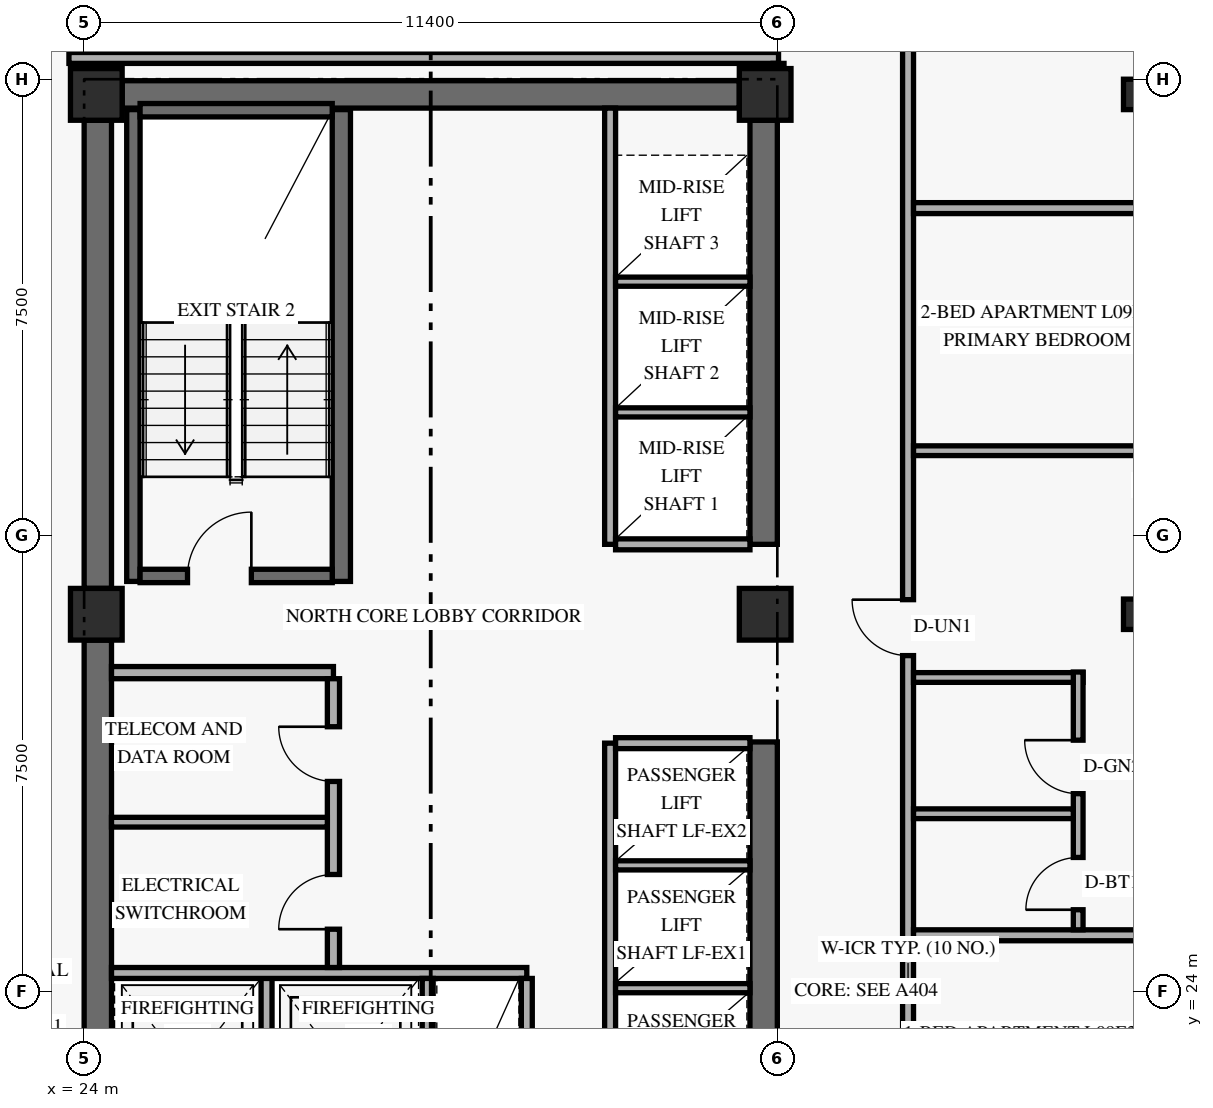
"""IFC4 building model, lengths in metres.
Left out: names, types, materials, properties, quantities, classifications, styles, units other than length and angle.
Written with IfcOpenShell. Run it as: python <this file> out.ifc"""

import sys

from ifc_helpers import new_model, si_unit, direction, frame, frame_2d, origin, origin_2d, place, context, subcontext, project, spatial, rectangle, hollow_rectangle, extrude, element, fill, save


model = new_model("IFC4")
c1 = context("Model", 3, precision=1e-05, world=origin(), true_north=direction((0.0, 1.0)))
c2 = subcontext(c1, "Body", "Model", "MODEL_VIEW")
j1 = project(units=[si_unit("LENGTHUNIT", "METRE"), si_unit("PLANEANGLEUNIT", "RADIAN")], contexts=[c1])
p1 = place(None, origin())
s1 = spatial("IfcSite", under=j1, at=p1, CompositionType="ELEMENT")
p2 = place(p1, origin())
s2 = spatial("IfcBuilding", under=s1, at=p2, CompositionType="ELEMENT")
p3 = place(p2, frame((0.0, 0.0, 38.4)))
s3 = spatial("IfcBuildingStorey", under=s2, at=p3, CompositionType="ELEMENT", Elevation=38.4)
p4 = place(p3, frame((24.225, 17.975, 0.0), z_axis=(0.0, 0.0, 1.0), x_axis=(0.0, 1.0, 0.0)))
e1 = element("IfcWall", 1, at=p4, inside=s3, PredefinedType="SHEAR", context=c2, shape_type="SweptSolid", body=[
    extrude(rectangle(XDim=11.8, YDim=0.45, at=frame_2d((5.9, 0.0))), origin(), (0.0, 0.0, 1.0), 2.667),
])
p5 = place(p3, frame((24.225, 30.625, 0.0), z_axis=(0.0, 0.0, 1.0), x_axis=(0.0, 1.0, 0.0)))
e2 = element("IfcWall", 2, at=p5, inside=s3, PredefinedType="SHEAR", context=c2, shape_type="SweptSolid", body=[
    extrude(rectangle(XDim=7.7, YDim=0.45, at=frame_2d((3.85, 0.0))), origin(), (0.0, 0.0, 1.0), 2.667),
])
p6 = place(p3, frame((35.175, 17.975, 0.0), z_axis=(0.0, 0.0, 1.0), x_axis=(0.0, 1.0, 0.0)))
e3 = element("IfcWall", 3, at=p6, inside=s3, PredefinedType="SHEAR", context=c2, shape_type="SweptSolid", body=[
    extrude(rectangle(XDim=10.125, YDim=0.45, at=frame_2d((5.062, 0.0))), origin(), (0.0, 0.0, 1.0), 2.667),
])
p7 = place(p3, frame((35.175, 31.35, 0.0), z_axis=(0.0, 0.0, 1.0), x_axis=(0.0, 1.0, 0.0)))
e4 = element("IfcWall", 4, at=p7, inside=s3, PredefinedType="SHEAR", context=c2, shape_type="SweptSolid", body=[
    extrude(rectangle(XDim=6.975, YDim=0.45, at=frame_2d((3.487, 0.0))), origin(), (0.0, 0.0, 1.0), 2.667),
])
p8 = place(p3, frame((24.625, 38.75, 0.0), z_axis=(0.0, 0.0, 1.0), x_axis=(1.0, 0.0, 0.0)))
e5 = element("IfcWall", 5, at=p8, inside=s3, PredefinedType="SHEAR", context=c2, shape_type="SweptSolid", body=[
    extrude(rectangle(XDim=10.15, YDim=0.45, at=frame_2d((5.075, 0.0))), origin(), (0.0, 0.0, 1.0), 3.36),
])
p9 = place(p3, frame((24.81, 30.74, 0.0), z_axis=(0.0, 0.0, 1.0), x_axis=(0.0, 1.0, 0.0)))
e6 = element("IfcWall", 6, at=p9, inside=s3, PredefinedType="SHEAR", context=c2, shape_type="SweptSolid", body=[
    extrude(rectangle(XDim=7.76, YDim=0.22, at=frame_2d((3.88, 0.0))), origin(), (0.0, 0.0, 1.0), 3.36),
])
p10 = place(p3, frame((28.23, 30.74, 0.0), z_axis=(0.0, 0.0, 1.0), x_axis=(0.0, 1.0, 0.0)))
e7 = element("IfcWall", 7, at=p10, inside=s3, PredefinedType="SHEAR", context=c2, shape_type="SweptSolid", body=[
    extrude(rectangle(XDim=7.76, YDim=0.3, at=frame_2d((3.88, 0.0))), origin(), (0.0, 0.0, 1.0), 3.36),
])
p11 = place(p3, frame((24.92, 30.83, 0.0), z_axis=(0.0, 0.0, 1.0), x_axis=(1.0, 0.0, 0.0)))
e8 = element("IfcWall", 8, at=p11, inside=s3, PredefinedType="SHEAR", context=c2, shape_type="SweptSolid", body=[
    extrude(rectangle(XDim=3.16, YDim=0.22, at=frame_2d((1.58, 0.0))), origin(), (0.0, 0.0, 1.0), 3.36),
])
p12 = place(p11, frame((0.78, 0.0, 0.0)))
e9 = element("IfcOpeningElement", 9, at=p12, cuts=e8, PredefinedType="OPENING", context=c2, shape_type="SweptSolid", body=[
    extrude(rectangle(XDim=1.05, YDim=2.15, at=frame_2d((0.525, 1.075))), frame((0.0, 0.12, 0.0), z_axis=(0.0, -1.0, 0.0), x_axis=(1.0, 0.0, 0.0)), (0.0, 0.0, 1.0), 0.24),
])
p13 = place(p3, frame((24.92, 38.49, 0.0), z_axis=(0.0, 0.0, 1.0), x_axis=(1.0, 0.0, 0.0)))
e10 = element("IfcWall", 10, at=p13, inside=s3, PredefinedType="SHEAR", context=c2, shape_type="SweptSolid", body=[
    extrude(rectangle(XDim=3.16, YDim=0.22, at=frame_2d((1.58, 0.0))), origin(), (0.0, 0.0, 1.0), 3.36),
])
for number, where, z_axis, x_axis in (
    (11, (24.2, 30.2, 0.0), (0.0, 0.0, 1.0), (1.0, 0.0, 0.0)),
    (12, (24.2, 38.75, 0.0), (0.0, 0.0, 1.0), (1.0, 0.0, 0.0)),
    (13, (35.2, 30.2, 0.0), (0.0, 0.0, 1.0), (1.0, 0.0, 0.0)),
    (14, (35.2, 38.75, 0.0), (0.0, 0.0, 1.0), (1.0, 0.0, 0.0)),
):
    element("IfcColumn", number, at=place(p3, frame(where, z_axis=z_axis, x_axis=x_axis)), inside=s3, PredefinedType="COLUMN", context=c2, shape_type="SweptSolid", body=[
        extrude(rectangle(XDim=0.85, YDim=0.85, at=origin_2d()), origin(), (0.0, 0.0, 1.0), 3.6),
    ])
for number, where, z_axis, x_axis in (
    (15, (41.28, 30.2, 0.0), (0.035, 0.0, 0.999), (0.0, 1.0, 0.0)),
    (16, (41.28, 38.75, 0.0), (0.035, 0.0, 0.999), (0.0, 1.0, 0.0)),
):
    element("IfcColumn", number, at=place(p3, frame(where, z_axis=z_axis, x_axis=x_axis)), inside=s3, PredefinedType="COLUMN", context=c2, shape_type="SweptSolid", body=[
        extrude(hollow_rectangle(XDim=0.5, YDim=0.5, WallThickness=0.022, at=origin_2d()), origin(), (0.0, 0.0, 1.0), 3.602),
    ])
p14 = place(p3, frame((27.0, 21.19, 0.0), z_axis=(0.0, 0.0, 1.0), x_axis=(0.0, 1.0, 0.0)))
e17 = element("IfcWall", 17, at=p14, inside=s3, PredefinedType="STANDARD", context=c2, shape_type="SweptSolid", body=[
    extrude(rectangle(XDim=3.11, YDim=0.18, at=frame_2d((1.555, 0.0))), origin(), (0.0, 0.0, 1.0), 3.36),
])
p15 = place(p3, frame((24.45, 24.3, 0.0), z_axis=(0.0, 0.0, 1.0), x_axis=(1.0, 0.0, 0.0)))
e18 = element("IfcWall", 18, at=p15, inside=s3, PredefinedType="STANDARD", context=c2, shape_type="SweptSolid", body=[
    extrude(rectangle(XDim=6.83, YDim=0.18, at=frame_2d((3.415, 0.0))), origin(), (0.0, 0.0, 1.0), 3.36),
])
for number, where, z_axis, x_axis in (
    (19, (29.65, 21.19, 0.0), (0.0, 0.0, 1.0), (0.0, 1.0, 0.0)),
    (20, (31.28, 21.19, 0.0), (0.0, 0.0, 1.0), (0.0, 1.0, 0.0)),
):
    element("IfcWall", number, at=place(p3, frame(where, z_axis=z_axis, x_axis=x_axis)), inside=s3, PredefinedType="STANDARD", context=c2, shape_type="SweptSolid", body=[
        extrude(rectangle(XDim=3.02, YDim=0.18, at=frame_2d((1.51, 0.0))), origin(), (0.0, 0.0, 1.0), 3.36),
    ])
p16 = place(p3, frame((24.45, 29.24, 0.0), z_axis=(0.0, 0.0, 1.0), x_axis=(1.0, 0.0, 0.0)))
e21 = element("IfcWall", 21, at=p16, inside=s3, PredefinedType="STANDARD", context=c2, shape_type="SweptSolid", body=[
    extrude(rectangle(XDim=3.65, YDim=0.2, at=frame_2d((1.825, 0.0))), origin(), (0.0, 0.0, 1.0), 3.36),
])
p17 = place(p3, frame((28.1, 24.39, 0.0), z_axis=(0.0, 0.0, 1.0), x_axis=(0.0, 1.0, 0.0)))
e22 = element("IfcWall", 22, at=p17, inside=s3, PredefinedType="STANDARD", context=c2, shape_type="SweptSolid", body=[
    extrude(rectangle(XDim=4.75, YDim=0.2, at=frame_2d((2.375, 0.0))), origin(), (0.0, 0.0, 1.0), 3.36),
])
p18 = place(p17, frame((0.63, 0.0, 0.0)))
e23 = element("IfcOpeningElement", 23, at=p18, cuts=e22, PredefinedType="OPENING", context=c2, shape_type="SweptSolid", body=[
    extrude(rectangle(XDim=0.9, YDim=2.1, at=frame_2d((0.45, 1.05))), frame((0.0, 0.11, 0.0), z_axis=(0.0, -1.0, 0.0), x_axis=(1.0, 0.0, 0.0)), (0.0, 0.0, 1.0), 0.22),
])
p19 = place(p17, frame((3.06, 0.0, 0.0)))
e24 = element("IfcOpeningElement", 24, at=p19, cuts=e22, PredefinedType="OPENING", context=c2, shape_type="SweptSolid", body=[
    extrude(rectangle(XDim=0.9, YDim=2.1, at=frame_2d((0.45, 1.05))), frame((0.0, 0.11, 0.0), z_axis=(0.0, -1.0, 0.0), x_axis=(1.0, 0.0, 0.0)), (0.0, 0.0, 1.0), 0.22),
])
p20 = place(p3, frame((24.45, 26.78, 0.0), z_axis=(0.0, 0.0, 1.0), x_axis=(1.0, 0.0, 0.0)))
e25 = element("IfcWall", 25, at=p20, inside=s3, PredefinedType="PARTITIONING", context=c2, shape_type="SweptSolid", body=[
    extrude(rectangle(XDim=3.55, YDim=0.16, at=frame_2d((1.775, 0.0))), origin(), (0.0, 0.0, 1.0), 3.36),
])
p21 = place(p3, frame((32.65, 18.02, 0.0), z_axis=(0.0, 0.0, 1.0), x_axis=(0.0, 1.0, 0.0)))
e26 = element("IfcWall", 26, at=p21, inside=s3, PredefinedType="STANDARD", context=c2, shape_type="SweptSolid", body=[
    extrude(rectangle(XDim=10.06, YDim=0.18, at=frame_2d((5.03, 0.0))), origin(), (0.0, 0.0, 1.0), 3.36),
])
p22 = place(p3, frame((32.74, 28.08, 0.0), z_axis=(0.0, 0.0, 1.0), x_axis=(1.0, 0.0, 0.0)))
e27 = element("IfcWall", 27, at=p22, inside=s3, PredefinedType="STANDARD", context=c2, shape_type="SweptSolid", body=[
    extrude(rectangle(XDim=2.21, YDim=0.18, at=frame_2d((1.105, 0.0))), origin(), (0.0, 0.0, 1.0), 3.36),
])
for number, where, z_axis, x_axis in (
    (28, (32.74, 24.05, 0.0), (0.0, 0.0, 1.0), (1.0, 0.0, 0.0)),
    (29, (32.74, 26.07, 0.0), (0.0, 0.0, 1.0), (1.0, 0.0, 0.0)),
):
    element("IfcWall", number, at=place(p3, frame(where, z_axis=z_axis, x_axis=x_axis)), inside=s3, PredefinedType="STANDARD", context=c2, shape_type="SweptSolid", body=[
        extrude(rectangle(XDim=2.21, YDim=0.15, at=frame_2d((1.105, 0.0))), origin(), (0.0, 0.0, 1.0), 3.36),
    ])
p23 = place(p3, frame((32.65, 31.35, 0.0), z_axis=(0.0, 0.0, 1.0), x_axis=(0.0, 1.0, 0.0)))
e30 = element("IfcWall", 30, at=p23, inside=s3, PredefinedType="STANDARD", context=c2, shape_type="SweptSolid", body=[
    extrude(rectangle(XDim=7.175, YDim=0.18, at=frame_2d((3.587, 0.0))), origin(), (0.0, 0.0, 1.0), 3.36),
])
p24 = place(p3, frame((32.74, 31.35, 0.0), z_axis=(0.0, 0.0, 1.0), x_axis=(1.0, 0.0, 0.0)))
e31 = element("IfcWall", 31, at=p24, inside=s3, PredefinedType="STANDARD", context=c2, shape_type="SweptSolid", body=[
    extrude(rectangle(XDim=2.21, YDim=0.18, at=frame_2d((1.105, 0.0))), origin(), (0.0, 0.0, 1.0), 3.36),
])
for number, where, z_axis, x_axis in (
    (32, (32.74, 33.52, 0.0), (0.0, 0.0, 1.0), (1.0, 0.0, 0.0)),
    (33, (32.74, 35.67, 0.0), (0.0, 0.0, 1.0), (1.0, 0.0, 0.0)),
):
    element("IfcWall", number, at=place(p3, frame(where, z_axis=z_axis, x_axis=x_axis)), inside=s3, PredefinedType="STANDARD", context=c2, shape_type="SweptSolid", body=[
        extrude(rectangle(XDim=2.21, YDim=0.15, at=frame_2d((1.105, 0.0))), origin(), (0.0, 0.0, 1.0), 3.36),
    ])
p25 = place(p3, frame((37.55, 1.29, 0.0), z_axis=(0.0, 0.0, 1.0), x_axis=(0.0, 1.0, 0.0)))
e34 = element("IfcWall", 34, at=p25, inside=s3, PredefinedType="STANDARD", context=c2, shape_type="SweptSolid", body=[
    extrude(rectangle(XDim=45.42, YDim=0.18, at=frame_2d((22.71, 0.0))), origin(), (0.0, 0.0, 1.0), 2.649),
])
p26 = place(p25, frame((4.46, 0.0, 0.0)))
e35 = element("IfcOpeningElement", 35, at=p26, cuts=e34, PredefinedType="OPENING", context=c2, shape_type="SweptSolid", body=[
    extrude(rectangle(XDim=0.92, YDim=2.15, at=frame_2d((0.46, 1.075))), frame((0.0, 0.1, 0.0), z_axis=(0.0, -1.0, 0.0), x_axis=(1.0, 0.0, 0.0)), (0.0, 0.0, 1.0), 0.2),
])
p27 = place(p25, frame((15.907, 0.0, 0.0)))
e36 = element("IfcOpeningElement", 36, at=p27, cuts=e34, PredefinedType="OPENING", context=c2, shape_type="SweptSolid", body=[
    extrude(rectangle(XDim=0.92, YDim=2.15, at=frame_2d((0.46, 1.075))), frame((0.0, 0.1, 0.0), z_axis=(0.0, -1.0, 0.0), x_axis=(1.0, 0.0, 0.0)), (0.0, 0.0, 1.0), 0.2),
])
p28 = place(p25, frame((28.23, 0.0, 0.0)))
e37 = element("IfcOpeningElement", 37, at=p28, cuts=e34, PredefinedType="OPENING", context=c2, shape_type="SweptSolid", body=[
    extrude(rectangle(XDim=0.92, YDim=2.15, at=frame_2d((0.46, 1.075))), frame((0.0, 0.1, 0.0), z_axis=(0.0, -1.0, 0.0), x_axis=(1.0, 0.0, 0.0)), (0.0, 0.0, 1.0), 0.2),
])
p29 = place(p25, frame((40.02, 0.0, 0.0)))
e38 = element("IfcOpeningElement", 38, at=p29, cuts=e34, PredefinedType="OPENING", context=c2, shape_type="SweptSolid", body=[
    extrude(rectangle(XDim=0.92, YDim=2.15, at=frame_2d((0.46, 1.075))), frame((0.0, 0.1, 0.0), z_axis=(0.0, -1.0, 0.0), x_axis=(1.0, 0.0, 0.0)), (0.0, 0.0, 1.0), 0.2),
])
p30 = place(p3, frame((23.75, 39.35, 0.0), z_axis=(0.0, 0.0, 1.0), x_axis=(1.0, 0.0, 0.0)))
e39 = element("IfcWall", 39, at=p30, inside=s3, PredefinedType="STANDARD", context=c2, shape_type="SweptSolid", body=[
    extrude(rectangle(XDim=11.67, YDim=0.18, at=frame_2d((5.835, 0.0))), origin(), (0.0, 0.0, 1.0), 2.649),
])
p31 = place(p3, frame((35.42, 38.75, 0.0), z_axis=(0.0, 0.0, 1.0), x_axis=(0.0, 1.0, 0.0)))
e40 = element("IfcWall", 40, at=p31, inside=s3, PredefinedType="STANDARD", context=c2, shape_type="SweptSolid", body=[
    extrude(rectangle(XDim=0.51, YDim=0.18, at=frame_2d((0.255, 0.0))), origin(), (0.0, 0.0, 1.0), 3.36),
])
p32 = place(p3, frame((37.64, 24.92, 0.0), z_axis=(0.0, 0.0, 1.0), x_axis=(1.0, 0.0, 0.0)))
e41 = element("IfcWall", 41, at=p32, inside=s3, PredefinedType="PARTITIONING", context=c2, shape_type="SweptSolid", body=[
    extrude(rectangle(XDim=10.67, YDim=0.18, at=frame_2d((5.335, 0.0))), origin(), (0.0, 0.0, 1.0), 2.649),
])
p33 = place(p3, frame((37.64, 32.89, 0.0), z_axis=(0.0, 0.0, 1.0), x_axis=(1.0, 0.0, 0.0)))
e42 = element("IfcWall", 42, at=p33, inside=s3, PredefinedType="PARTITIONING", context=c2, shape_type="SweptSolid", body=[
    extrude(rectangle(XDim=10.67, YDim=0.16, at=frame_2d((5.335, 0.0))), origin(), (0.0, 0.0, 1.0), 2.649),
])
p34 = place(p33, frame((3.662, 0.0, 0.0)))
e43 = element("IfcOpeningElement", 43, at=p34, cuts=e42, PredefinedType="OPENING", context=c2, shape_type="SweptSolid", body=[
    extrude(rectangle(XDim=0.88, YDim=2.14, at=frame_2d((0.44, 1.07))), frame((0.0, 0.09, 0.0), z_axis=(0.0, -1.0, 0.0), x_axis=(1.0, 0.0, 0.0)), (0.0, 0.0, 1.0), 0.18),
])
p35 = place(p33, frame((6.222, 0.0, 0.0)))
e44 = element("IfcOpeningElement", 44, at=p35, cuts=e42, PredefinedType="OPENING", context=c2, shape_type="SweptSolid", body=[
    extrude(rectangle(XDim=0.88, YDim=2.14, at=frame_2d((0.44, 1.07))), frame((0.0, 0.09, 0.0), z_axis=(0.0, -1.0, 0.0), x_axis=(1.0, 0.0, 0.0)), (0.0, 0.0, 1.0), 0.18),
])
p36 = place(p3, frame((37.64, 29.16, 0.0), z_axis=(0.0, 0.0, 1.0), x_axis=(1.0, 0.0, 0.0)))
e45 = element("IfcWall", 45, at=p36, inside=s3, PredefinedType="PLUMBINGWALL", context=c2, shape_type="SweptSolid", body=[
    extrude(rectangle(XDim=2.788, YDim=0.16, at=frame_2d((1.394, 0.0))), origin(), (0.0, 0.0, 1.0), 3.36),
])
p37 = place(p3, frame((40.348, 25.01, 0.0), z_axis=(0.0, 0.0, 1.0), x_axis=(0.0, 1.0, 0.0)))
e46 = element("IfcWall", 46, at=p37, inside=s3, PredefinedType="PLUMBINGWALL", context=c2, shape_type="SweptSolid", body=[
    extrude(rectangle(XDim=4.24, YDim=0.16, at=frame_2d((2.12, 0.0))), origin(), (0.0, 0.0, 1.0), 3.36),
])
p38 = place(p37, frame((0.33, 0.0, 0.0)))
e47 = element("IfcOpeningElement", 47, at=p38, cuts=e46, PredefinedType="OPENING", context=c2, shape_type="SweptSolid", body=[
    extrude(rectangle(XDim=0.86, YDim=2.12, at=frame_2d((0.43, 1.06))), frame((0.0, 0.09, 0.0), z_axis=(0.0, -1.0, 0.0), x_axis=(1.0, 0.0, 0.0)), (0.0, 0.0, 1.0), 0.18),
])
p39 = place(p37, frame((2.239, 0.0, 0.0)))
e48 = element("IfcOpeningElement", 48, at=p39, cuts=e46, PredefinedType="OPENING", context=c2, shape_type="SweptSolid", body=[
    extrude(rectangle(XDim=0.88, YDim=2.12, at=frame_2d((0.44, 1.06))), frame((0.0, 0.09, 0.0), z_axis=(0.0, -1.0, 0.0), x_axis=(1.0, 0.0, 0.0)), (0.0, 0.0, 1.0), 0.18),
])
p40 = place(p3, frame((37.64, 26.919, 0.0), z_axis=(0.0, 0.0, 1.0), x_axis=(1.0, 0.0, 0.0)))
e49 = element("IfcWall", 49, at=p40, inside=s3, PredefinedType="PLUMBINGWALL", context=c2, shape_type="SweptSolid", body=[
    extrude(rectangle(XDim=2.628, YDim=0.16, at=frame_2d((1.314, 0.0))), origin(), (0.0, 0.0, 1.0), 3.36),
])
p41 = place(p3, frame((37.64, 36.88, 0.0), z_axis=(0.0, 0.0, 1.0), x_axis=(1.0, 0.0, 0.0)))
e50 = element("IfcWall", 50, at=p41, inside=s3, PredefinedType="PARTITIONING", context=c2, shape_type="SweptSolid", body=[
    extrude(rectangle(XDim=10.67, YDim=0.18, at=frame_2d((5.335, 0.0))), origin(), (0.0, 0.0, 1.0), 2.649),
])
p42 = place(p12, origin())
e51 = element("IfcDoor", 51, at=p42, inside=s3, OperationType="SINGLE_SWING_RIGHT", PredefinedType="DOOR", context=c2, shape_type="SweptSolid", body=[
    extrude(rectangle(XDim=1.05, YDim=2.15, at=frame_2d((0.525, 1.075))), frame((0.0, 0.025, 0.0), z_axis=(0.0, -1.0, 0.0), x_axis=(1.0, 0.0, 0.0)), (0.0, 0.0, 1.0), 0.05),
])
fill(e9, e51)
p43 = place(p18, origin())
e52 = element("IfcDoor", 52, at=p43, inside=s3, OperationType="SINGLE_SWING_LEFT", PredefinedType="DOOR", context=c2, shape_type="SweptSolid", body=[
    extrude(rectangle(XDim=0.9, YDim=2.1, at=frame_2d((0.45, 1.05))), frame((0.0, 0.025, 0.0), z_axis=(0.0, -1.0, 0.0), x_axis=(1.0, 0.0, 0.0)), (0.0, 0.0, 1.0), 0.05),
])
fill(e23, e52)
p44 = place(p19, origin())
e53 = element("IfcDoor", 53, at=p44, inside=s3, OperationType="SINGLE_SWING_RIGHT", PredefinedType="DOOR", context=c2, shape_type="SweptSolid", body=[
    extrude(rectangle(XDim=0.9, YDim=2.1, at=frame_2d((0.45, 1.05))), frame((0.0, 0.025, 0.0), z_axis=(0.0, -1.0, 0.0), x_axis=(1.0, 0.0, 0.0)), (0.0, 0.0, 1.0), 0.05),
])
fill(e24, e53)
p45 = place(p28, origin())
e54 = element("IfcDoor", 54, at=p45, inside=s3, OperationType="SINGLE_SWING_RIGHT", PredefinedType="DOOR", context=c2, shape_type="SweptSolid", body=[
    extrude(rectangle(XDim=0.92, YDim=2.15, at=frame_2d((0.46, 1.075))), frame((0.0, 0.025, 0.0), z_axis=(0.0, -1.0, 0.0), x_axis=(1.0, 0.0, 0.0)), (0.0, 0.0, 1.0), 0.05),
])
fill(e37, e54)
p46 = place(p38, origin())
e55 = element("IfcDoor", 55, at=p46, inside=s3, OperationType="SINGLE_SWING_LEFT", PredefinedType="DOOR", context=c2, shape_type="SweptSolid", body=[
    extrude(rectangle(XDim=0.86, YDim=2.12, at=frame_2d((0.43, 1.06))), frame((0.0, 0.025, 0.0), z_axis=(0.0, -1.0, 0.0), x_axis=(1.0, 0.0, 0.0)), (0.0, 0.0, 1.0), 0.05),
])
fill(e47, e55)
p47 = place(p39, origin())
e56 = element("IfcDoor", 56, at=p47, inside=s3, OperationType="SINGLE_SWING_RIGHT", PredefinedType="DOOR", context=c2, shape_type="SweptSolid", body=[
    extrude(rectangle(XDim=0.88, YDim=2.12, at=frame_2d((0.44, 1.06))), frame((0.0, 0.025, 0.0), z_axis=(0.0, -1.0, 0.0), x_axis=(1.0, 0.0, 0.0)), (0.0, 0.0, 1.0), 0.05),
])
fill(e48, e56)
save(model, sys.argv[1])
